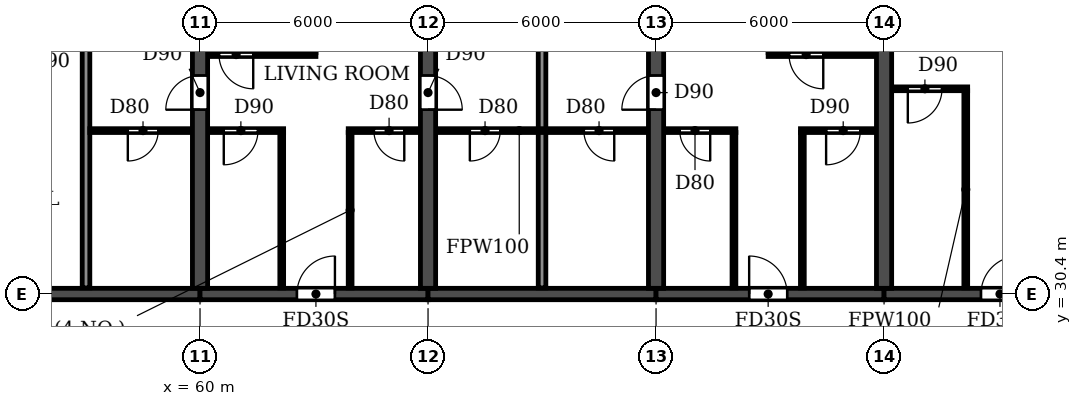
"""IFC4 building model, lengths in metres.
Left out: names, types, materials, properties, quantities, classifications, styles, units other than length and angle.
Written with IfcOpenShell. Run it as: python <this file> out.ifc"""

import sys

from ifc_helpers import new_model, si_unit, direction, frame, frame_2d, origin, place, context, subcontext, project, spatial, rectangle, extrude, element, fill, save


model = new_model("IFC4")
c1 = context("Model", 3, precision=1e-05, world=origin(), true_north=direction((0.0, 1.0)))
c2 = subcontext(c1, "Body", "Model", "MODEL_VIEW")
j1 = project(units=[si_unit("LENGTHUNIT", "METRE"), si_unit("PLANEANGLEUNIT", "RADIAN")], contexts=[c1])
p1 = place(None, origin())
s1 = spatial("IfcSite", under=j1, at=p1, CompositionType="ELEMENT")
p2 = place(p1, origin())
s2 = spatial("IfcBuilding", under=s1, at=p2, CompositionType="ELEMENT")
p3 = place(p2, frame((0.0, 0.0, 33.3)))
s3 = spatial("IfcBuildingStorey", under=s2, at=p3, CompositionType="ELEMENT", Elevation=33.3)
p4 = place(p3, frame((60.0, 30.55, 0.0), z_axis=(0.0, 0.0, 1.0), x_axis=(0.0, 1.0, 0.0)))
e1 = element("IfcWall", 1, at=p4, inside=s3, PredefinedType="SHEAR", context=c2, shape_type="SweptSolid", body=[
    extrude(rectangle(XDim=14.05, YDim=0.4, at=frame_2d((7.025, 0.0))), origin(), (0.0, 0.0, 1.0), 3.05),
])
p5 = place(p4, frame((4.7, 0.0, 0.0)))
e2 = element("IfcOpeningElement", 2, at=p5, cuts=e1, PredefinedType="OPENING", context=c2, shape_type="SweptSolid", body=[
    extrude(rectangle(XDim=0.9, YDim=2.1, at=frame_2d((0.45, 1.05))), frame((0.0, 0.21, 0.0), z_axis=(0.0, -1.0, 0.0), x_axis=(1.0, 0.0, 0.0)), (0.0, 0.0, 1.0), 0.42),
])
p6 = place(p3, frame((66.0, 30.55, 0.0), z_axis=(0.0, 0.0, 1.0), x_axis=(0.0, 1.0, 0.0)))
e3 = element("IfcWall", 3, at=p6, inside=s3, PredefinedType="SHEAR", context=c2, shape_type="SweptSolid", body=[
    extrude(rectangle(XDim=14.05, YDim=0.4, at=frame_2d((7.025, 0.0))), origin(), (0.0, 0.0, 1.0), 3.05),
])
p7 = place(p6, frame((4.7, 0.0, 0.0)))
e4 = element("IfcOpeningElement", 4, at=p7, cuts=e3, PredefinedType="OPENING", context=c2, shape_type="SweptSolid", body=[
    extrude(rectangle(XDim=0.9, YDim=2.1, at=frame_2d((0.45, 1.05))), frame((0.0, 0.21, 0.0), z_axis=(0.0, -1.0, 0.0), x_axis=(1.0, 0.0, 0.0)), (0.0, 0.0, 1.0), 0.42),
])
p8 = place(p3, frame((72.0, 30.55, 0.0), z_axis=(0.0, 0.0, 1.0), x_axis=(0.0, 1.0, 0.0)))
e5 = element("IfcWall", 5, at=p8, inside=s3, PredefinedType="SHEAR", context=c2, shape_type="SweptSolid", body=[
    extrude(rectangle(XDim=14.05, YDim=0.4, at=frame_2d((7.025, 0.0))), origin(), (0.0, 0.0, 1.0), 3.05),
])
p9 = place(p8, frame((4.7, 0.0, 0.0)))
e6 = element("IfcOpeningElement", 6, at=p9, cuts=e5, PredefinedType="OPENING", context=c2, shape_type="SweptSolid", body=[
    extrude(rectangle(XDim=0.9, YDim=2.1, at=frame_2d((0.45, 1.05))), frame((0.0, 0.21, 0.0), z_axis=(0.0, -1.0, 0.0), x_axis=(1.0, 0.0, 0.0)), (0.0, 0.0, 1.0), 0.42),
])
p10 = place(p3, frame((78.0, 30.55, 0.0), z_axis=(0.0, 0.0, 1.0), x_axis=(0.0, 1.0, 0.0)))
e7 = element("IfcWall", 7, at=p10, inside=s3, PredefinedType="SHEAR", context=c2, shape_type="SweptSolid", body=[
    extrude(rectangle(XDim=14.05, YDim=0.4, at=frame_2d((7.025, 0.0))), origin(), (0.0, 0.0, 1.0), 3.05),
])
p11 = place(p3, frame((54.0, 30.4, 0.0), z_axis=(0.0, 0.0, 1.0), x_axis=(1.0, 0.0, 0.0)))
e8 = element("IfcWall", 8, at=p11, inside=s3, PredefinedType="SHEAR", context=c2, shape_type="SweptSolid", body=[
    extrude(rectangle(XDim=6.0, YDim=0.3, at=frame_2d((3.0, 0.0))), origin(), (0.0, 0.0, 1.0), 2.45),
])
p12 = place(p3, frame((60.0, 30.4, 0.0), z_axis=(0.0, 0.0, 1.0), x_axis=(1.0, 0.0, 0.0)))
e9 = element("IfcWall", 9, at=p12, inside=s3, PredefinedType="SHEAR", context=c2, shape_type="SweptSolid", body=[
    extrude(rectangle(XDim=6.0, YDim=0.3, at=frame_2d((3.0, 0.0))), origin(), (0.0, 0.0, 1.0), 2.45),
])
p13 = place(p12, frame((2.55, 0.0, 0.0)))
e10 = element("IfcOpeningElement", 10, at=p13, cuts=e9, PredefinedType="OPENING", context=c2, shape_type="SweptSolid", body=[
    extrude(rectangle(XDim=1.0, YDim=2.1, at=frame_2d((0.5, 1.05))), frame((0.0, 0.16, 0.0), z_axis=(0.0, -1.0, 0.0), x_axis=(1.0, 0.0, 0.0)), (0.0, 0.0, 1.0), 0.32),
])
p14 = place(p3, frame((66.0, 30.4, 0.0), z_axis=(0.0, 0.0, 1.0), x_axis=(1.0, 0.0, 0.0)))
e11 = element("IfcWall", 11, at=p14, inside=s3, PredefinedType="SHEAR", context=c2, shape_type="SweptSolid", body=[
    extrude(rectangle(XDim=6.0, YDim=0.3, at=frame_2d((3.0, 0.0))), origin(), (0.0, 0.0, 1.0), 2.45),
])
p15 = place(p3, frame((72.0, 30.4, 0.0), z_axis=(0.0, 0.0, 1.0), x_axis=(1.0, 0.0, 0.0)))
e12 = element("IfcWall", 12, at=p15, inside=s3, PredefinedType="SHEAR", context=c2, shape_type="SweptSolid", body=[
    extrude(rectangle(XDim=6.0, YDim=0.3, at=frame_2d((3.0, 0.0))), origin(), (0.0, 0.0, 1.0), 2.45),
])
p16 = place(p15, frame((2.45, 0.0, 0.0)))
e13 = element("IfcOpeningElement", 13, at=p16, cuts=e12, PredefinedType="OPENING", context=c2, shape_type="SweptSolid", body=[
    extrude(rectangle(XDim=1.0, YDim=2.1, at=frame_2d((0.5, 1.05))), frame((0.0, 0.16, 0.0), z_axis=(0.0, -1.0, 0.0), x_axis=(1.0, 0.0, 0.0)), (0.0, 0.0, 1.0), 0.32),
])
p17 = place(p3, frame((78.0, 30.4, 0.0), z_axis=(0.0, 0.0, 1.0), x_axis=(1.0, 0.0, 0.0)))
e14 = element("IfcWall", 14, at=p17, inside=s3, PredefinedType="SHEAR", context=c2, shape_type="SweptSolid", body=[
    extrude(rectangle(XDim=6.0, YDim=0.3, at=frame_2d((3.0, 0.0))), origin(), (0.0, 0.0, 1.0), 2.45),
])
p18 = place(p17, frame((2.55, 0.0, 0.0)))
e15 = element("IfcOpeningElement", 15, at=p18, cuts=e14, PredefinedType="OPENING", context=c2, shape_type="SweptSolid", body=[
    extrude(rectangle(XDim=1.0, YDim=2.1, at=frame_2d((0.5, 1.05))), frame((0.0, 0.16, 0.0), z_axis=(0.0, -1.0, 0.0), x_axis=(1.0, 0.0, 0.0)), (0.0, 0.0, 1.0), 0.32),
])
for number, where, z_axis, x_axis in (
    (16, (57.0, 30.56, 0.0), (0.0, 0.0, 1.0), (0.0, 1.0, 0.0)),
    (17, (69.0, 30.56, 0.0), (0.0, 0.0, 1.0), (0.0, 1.0, 0.0)),
):
    element("IfcWall", number, at=place(p3, frame(where, z_axis=z_axis, x_axis=x_axis)), inside=s3, PredefinedType="PARTITIONING", context=c2, shape_type="SweptSolid", body=[
        extrude(rectangle(XDim=14.18, YDim=0.2, at=frame_2d((7.09, 0.0))), origin(), (0.0, 0.0, 1.0), 3.05),
    ])
p19 = place(p3, frame((57.1, 34.7, 0.0), z_axis=(0.0, 0.0, 1.0), x_axis=(1.0, 0.0, 0.0)))
e18 = element("IfcWall", 18, at=p19, inside=s3, PredefinedType="PARTITIONING", context=c2, shape_type="SweptSolid", body=[
    extrude(rectangle(XDim=2.69, YDim=0.1, at=frame_2d((1.345, 0.0))), origin(), (0.0, 0.0, 1.0), 3.05),
])
p20 = place(p19, frame((1.0, 0.0, 0.0)))
e19 = element("IfcOpeningElement", 19, at=p20, cuts=e18, PredefinedType="OPENING", context=c2, shape_type="SweptSolid", body=[
    extrude(rectangle(XDim=0.8, YDim=2.1, at=frame_2d((0.4, 1.05))), frame((0.0, 0.06, 0.0), z_axis=(0.0, -1.0, 0.0), x_axis=(1.0, 0.0, 0.0)), (0.0, 0.0, 1.0), 0.12),
])
p21 = place(p3, frame((60.21, 34.7, 0.0), z_axis=(0.0, 0.0, 1.0), x_axis=(1.0, 0.0, 0.0)))
e20 = element("IfcWall", 20, at=p21, inside=s3, PredefinedType="PARTITIONING", context=c2, shape_type="SweptSolid", body=[
    extrude(rectangle(XDim=1.99, YDim=0.1, at=frame_2d((0.995, 0.0))), origin(), (0.0, 0.0, 1.0), 3.05),
])
p22 = place(p21, frame((0.415, 0.0, 0.0)))
e21 = element("IfcOpeningElement", 21, at=p22, cuts=e20, PredefinedType="OPENING", context=c2, shape_type="SweptSolid", body=[
    extrude(rectangle(XDim=0.9, YDim=2.1, at=frame_2d((0.45, 1.05))), frame((0.0, 0.06, 0.0), z_axis=(0.0, -1.0, 0.0), x_axis=(1.0, 0.0, 0.0)), (0.0, 0.0, 1.0), 0.12),
])
p23 = place(p3, frame((63.9, 34.7, 0.0), z_axis=(0.0, 0.0, 1.0), x_axis=(1.0, 0.0, 0.0)))
e22 = element("IfcWall", 22, at=p23, inside=s3, PredefinedType="PARTITIONING", context=c2, shape_type="SweptSolid", body=[
    extrude(rectangle(XDim=1.89, YDim=0.1, at=frame_2d((0.945, 0.0))), origin(), (0.0, 0.0, 1.0), 3.05),
])
p24 = place(p23, frame((0.675, 0.0, 0.0)))
e23 = element("IfcOpeningElement", 23, at=p24, cuts=e22, PredefinedType="OPENING", context=c2, shape_type="SweptSolid", body=[
    extrude(rectangle(XDim=0.8, YDim=2.1, at=frame_2d((0.4, 1.05))), frame((0.0, 0.06, 0.0), z_axis=(0.0, -1.0, 0.0), x_axis=(1.0, 0.0, 0.0)), (0.0, 0.0, 1.0), 0.12),
])
p25 = place(p3, frame((66.21, 34.7, 0.0), z_axis=(0.0, 0.0, 1.0), x_axis=(1.0, 0.0, 0.0)))
e24 = element("IfcWall", 24, at=p25, inside=s3, PredefinedType="PARTITIONING", context=c2, shape_type="SweptSolid", body=[
    extrude(rectangle(XDim=5.58, YDim=0.1, at=frame_2d((2.79, 0.0))), origin(), (0.0, 0.0, 1.0), 3.05),
])
p26 = place(p25, frame((0.89, 0.0, 0.0)))
e25 = element("IfcOpeningElement", 25, at=p26, cuts=e24, PredefinedType="OPENING", context=c2, shape_type="SweptSolid", body=[
    extrude(rectangle(XDim=0.8, YDim=2.1, at=frame_2d((0.4, 1.05))), frame((0.0, 0.06, 0.0), z_axis=(0.0, -1.0, 0.0), x_axis=(1.0, 0.0, 0.0)), (0.0, 0.0, 1.0), 0.12),
])
p27 = place(p25, frame((3.89, 0.0, 0.0)))
e26 = element("IfcOpeningElement", 26, at=p27, cuts=e24, PredefinedType="OPENING", context=c2, shape_type="SweptSolid", body=[
    extrude(rectangle(XDim=0.8, YDim=2.1, at=frame_2d((0.4, 1.05))), frame((0.0, 0.06, 0.0), z_axis=(0.0, -1.0, 0.0), x_axis=(1.0, 0.0, 0.0)), (0.0, 0.0, 1.0), 0.12),
])
p28 = place(p3, frame((72.21, 34.7, 0.0), z_axis=(0.0, 0.0, 1.0), x_axis=(1.0, 0.0, 0.0)))
e27 = element("IfcWall", 27, at=p28, inside=s3, PredefinedType="PARTITIONING", context=c2, shape_type="SweptSolid", body=[
    extrude(rectangle(XDim=1.89, YDim=0.1, at=frame_2d((0.945, 0.0))), origin(), (0.0, 0.0, 1.0), 3.05),
])
p29 = place(p28, frame((0.415, 0.0, 0.0)))
e28 = element("IfcOpeningElement", 28, at=p29, cuts=e27, PredefinedType="OPENING", context=c2, shape_type="SweptSolid", body=[
    extrude(rectangle(XDim=0.8, YDim=2.1, at=frame_2d((0.4, 1.05))), frame((0.0, 0.06, 0.0), z_axis=(0.0, -1.0, 0.0), x_axis=(1.0, 0.0, 0.0)), (0.0, 0.0, 1.0), 0.12),
])
p30 = place(p3, frame((75.8, 34.7, 0.0), z_axis=(0.0, 0.0, 1.0), x_axis=(1.0, 0.0, 0.0)))
e29 = element("IfcWall", 29, at=p30, inside=s3, PredefinedType="PARTITIONING", context=c2, shape_type="SweptSolid", body=[
    extrude(rectangle(XDim=1.99, YDim=0.1, at=frame_2d((0.995, 0.0))), origin(), (0.0, 0.0, 1.0), 3.05),
])
p31 = place(p30, frame((0.675, 0.0, 0.0)))
e30 = element("IfcOpeningElement", 30, at=p31, cuts=e29, PredefinedType="OPENING", context=c2, shape_type="SweptSolid", body=[
    extrude(rectangle(XDim=0.9, YDim=2.1, at=frame_2d((0.45, 1.05))), frame((0.0, 0.06, 0.0), z_axis=(0.0, -1.0, 0.0), x_axis=(1.0, 0.0, 0.0)), (0.0, 0.0, 1.0), 0.12),
])
p32 = place(p3, frame((78.21, 35.8, 0.0), z_axis=(0.0, 0.0, 1.0), x_axis=(1.0, 0.0, 0.0)))
e31 = element("IfcWall", 31, at=p32, inside=s3, PredefinedType="PARTITIONING", context=c2, shape_type="SweptSolid", body=[
    extrude(rectangle(XDim=1.99, YDim=0.1, at=frame_2d((0.995, 0.0))), origin(), (0.0, 0.0, 1.0), 3.05),
])
p33 = place(p32, frame((0.415, 0.0, 0.0)))
e32 = element("IfcOpeningElement", 32, at=p33, cuts=e31, PredefinedType="OPENING", context=c2, shape_type="SweptSolid", body=[
    extrude(rectangle(XDim=0.9, YDim=2.1, at=frame_2d((0.45, 1.05))), frame((0.0, 0.06, 0.0), z_axis=(0.0, -1.0, 0.0), x_axis=(1.0, 0.0, 0.0)), (0.0, 0.0, 1.0), 0.12),
])
p34 = place(p3, frame((60.21, 36.7, 0.0), z_axis=(0.0, 0.0, 1.0), x_axis=(1.0, 0.0, 0.0)))
e33 = element("IfcWall", 33, at=p34, inside=s3, PredefinedType="PARTITIONING", context=c2, shape_type="SweptSolid", body=[
    extrude(rectangle(XDim=2.84, YDim=0.1, at=frame_2d((1.42, 0.0))), origin(), (0.0, 0.0, 1.0), 3.05),
])
p35 = place(p34, frame((0.29, 0.0, 0.0)))
e34 = element("IfcOpeningElement", 34, at=p35, cuts=e33, PredefinedType="OPENING", context=c2, shape_type="SweptSolid", body=[
    extrude(rectangle(XDim=0.9, YDim=2.1, at=frame_2d((0.45, 1.05))), frame((0.0, 0.06, 0.0), z_axis=(0.0, -1.0, 0.0), x_axis=(1.0, 0.0, 0.0)), (0.0, 0.0, 1.0), 0.12),
])
p36 = place(p3, frame((74.95, 36.7, 0.0), z_axis=(0.0, 0.0, 1.0), x_axis=(1.0, 0.0, 0.0)))
e35 = element("IfcWall", 35, at=p36, inside=s3, PredefinedType="PARTITIONING", context=c2, shape_type="SweptSolid", body=[
    extrude(rectangle(XDim=2.84, YDim=0.1, at=frame_2d((1.42, 0.0))), origin(), (0.0, 0.0, 1.0), 3.05),
])
p37 = place(p36, frame((0.55, 0.0, 0.0)))
e36 = element("IfcOpeningElement", 36, at=p37, cuts=e35, PredefinedType="OPENING", context=c2, shape_type="SweptSolid", body=[
    extrude(rectangle(XDim=0.9, YDim=2.1, at=frame_2d((0.45, 1.05))), frame((0.0, 0.06, 0.0), z_axis=(0.0, -1.0, 0.0), x_axis=(1.0, 0.0, 0.0)), (0.0, 0.0, 1.0), 0.12),
])
for number, where, z_axis, x_axis in (
    (37, (62.15, 30.56, 0.0), (0.0, 0.0, 1.0), (0.0, 1.0, 0.0)),
    (38, (63.95, 30.56, 0.0), (0.0, 0.0, 1.0), (0.0, 1.0, 0.0)),
    (39, (74.05, 30.56, 0.0), (0.0, 0.0, 1.0), (0.0, 1.0, 0.0)),
    (40, (75.85, 30.56, 0.0), (0.0, 0.0, 1.0), (0.0, 1.0, 0.0)),
):
    element("IfcWall", number, at=place(p3, frame(where, z_axis=z_axis, x_axis=x_axis)), inside=s3, PredefinedType="PARTITIONING", context=c2, shape_type="SweptSolid", body=[
        extrude(rectangle(XDim=4.09, YDim=0.1, at=frame_2d((2.045, 0.0))), origin(), (0.0, 0.0, 1.0), 3.05),
    ])
p38 = place(p3, frame((80.15, 30.56, 0.0), z_axis=(0.0, 0.0, 1.0), x_axis=(0.0, 1.0, 0.0)))
e41 = element("IfcWall", 41, at=p38, inside=s3, PredefinedType="PARTITIONING", context=c2, shape_type="SweptSolid", body=[
    extrude(rectangle(XDim=5.19, YDim=0.1, at=frame_2d((2.595, 0.0))), origin(), (0.0, 0.0, 1.0), 3.05),
])
p39 = place(p20, frame((0.8, 0.0, 0.0), z_axis=(0.0, 0.0, 1.0), x_axis=(-1.0, 0.0, 0.0)))
e42 = element("IfcDoor", 42, at=p39, inside=s3, OperationType="SINGLE_SWING_RIGHT", PredefinedType="DOOR", context=c2, shape_type="SweptSolid", body=[
    extrude(rectangle(XDim=0.8, YDim=2.1, at=frame_2d((0.4, 1.05))), frame((0.0, 0.025, 0.0), z_axis=(0.0, -1.0, 0.0), x_axis=(1.0, 0.0, 0.0)), (0.0, 0.0, 1.0), 0.05),
])
fill(e19, e42)
p40 = place(p26, frame((0.8, 0.0, 0.0), z_axis=(0.0, 0.0, 1.0), x_axis=(-1.0, 0.0, 0.0)))
e43 = element("IfcDoor", 43, at=p40, inside=s3, OperationType="SINGLE_SWING_RIGHT", PredefinedType="DOOR", context=c2, shape_type="SweptSolid", body=[
    extrude(rectangle(XDim=0.8, YDim=2.1, at=frame_2d((0.4, 1.05))), frame((0.0, 0.025, 0.0), z_axis=(0.0, -1.0, 0.0), x_axis=(1.0, 0.0, 0.0)), (0.0, 0.0, 1.0), 0.05),
])
fill(e25, e43)
p41 = place(p5, origin())
e44 = element("IfcDoor", 44, at=p41, inside=s3, OperationType="SINGLE_SWING_LEFT", PredefinedType="DOOR", context=c2, shape_type="SweptSolid", body=[
    extrude(rectangle(XDim=0.9, YDim=2.1, at=frame_2d((0.45, 1.05))), frame((0.0, 0.025, 0.0), z_axis=(0.0, -1.0, 0.0), x_axis=(1.0, 0.0, 0.0)), (0.0, 0.0, 1.0), 0.05),
])
fill(e2, e44)
p42 = place(p35, frame((0.9, 0.0, 0.0), z_axis=(0.0, 0.0, 1.0), x_axis=(-1.0, 0.0, 0.0)))
e45 = element("IfcDoor", 45, at=p42, inside=s3, OperationType="SINGLE_SWING_LEFT", PredefinedType="DOOR", context=c2, shape_type="SweptSolid", body=[
    extrude(rectangle(XDim=0.9, YDim=2.1, at=frame_2d((0.45, 1.05))), frame((0.0, 0.025, 0.0), z_axis=(0.0, -1.0, 0.0), x_axis=(1.0, 0.0, 0.0)), (0.0, 0.0, 1.0), 0.05),
])
fill(e34, e45)
p43 = place(p22, frame((0.9, 0.0, 0.0), z_axis=(0.0, 0.0, 1.0), x_axis=(-1.0, 0.0, 0.0)))
e46 = element("IfcDoor", 46, at=p43, inside=s3, OperationType="SINGLE_SWING_RIGHT", PredefinedType="DOOR", context=c2, shape_type="SweptSolid", body=[
    extrude(rectangle(XDim=0.9, YDim=2.1, at=frame_2d((0.45, 1.05))), frame((0.0, 0.025, 0.0), z_axis=(0.0, -1.0, 0.0), x_axis=(1.0, 0.0, 0.0)), (0.0, 0.0, 1.0), 0.05),
])
fill(e21, e46)
p44 = place(p13, origin())
e47 = element("IfcDoor", 47, at=p44, inside=s3, OperationType="SINGLE_SWING_RIGHT", PredefinedType="DOOR", context=c2, shape_type="SweptSolid", body=[
    extrude(rectangle(XDim=1.0, YDim=2.1, at=frame_2d((0.5, 1.05))), frame((0.0, 0.025, 0.0), z_axis=(0.0, -1.0, 0.0), x_axis=(1.0, 0.0, 0.0)), (0.0, 0.0, 1.0), 0.05),
])
fill(e10, e47)
p45 = place(p24, frame((0.8, 0.0, 0.0), z_axis=(0.0, 0.0, 1.0), x_axis=(-1.0, 0.0, 0.0)))
e48 = element("IfcDoor", 48, at=p45, inside=s3, OperationType="SINGLE_SWING_LEFT", PredefinedType="DOOR", context=c2, shape_type="SweptSolid", body=[
    extrude(rectangle(XDim=0.8, YDim=2.1, at=frame_2d((0.4, 1.05))), frame((0.0, 0.025, 0.0), z_axis=(0.0, -1.0, 0.0), x_axis=(1.0, 0.0, 0.0)), (0.0, 0.0, 1.0), 0.05),
])
fill(e23, e48)
p46 = place(p7, frame((0.9, 0.0, 0.0), z_axis=(0.0, 0.0, 1.0), x_axis=(-1.0, 0.0, 0.0)))
e49 = element("IfcDoor", 49, at=p46, inside=s3, OperationType="SINGLE_SWING_RIGHT", PredefinedType="DOOR", context=c2, shape_type="SweptSolid", body=[
    extrude(rectangle(XDim=0.9, YDim=2.1, at=frame_2d((0.45, 1.05))), frame((0.0, 0.025, 0.0), z_axis=(0.0, -1.0, 0.0), x_axis=(1.0, 0.0, 0.0)), (0.0, 0.0, 1.0), 0.05),
])
fill(e4, e49)
p47 = place(p27, frame((0.8, 0.0, 0.0), z_axis=(0.0, 0.0, 1.0), x_axis=(-1.0, 0.0, 0.0)))
e50 = element("IfcDoor", 50, at=p47, inside=s3, OperationType="SINGLE_SWING_LEFT", PredefinedType="DOOR", context=c2, shape_type="SweptSolid", body=[
    extrude(rectangle(XDim=0.8, YDim=2.1, at=frame_2d((0.4, 1.05))), frame((0.0, 0.025, 0.0), z_axis=(0.0, -1.0, 0.0), x_axis=(1.0, 0.0, 0.0)), (0.0, 0.0, 1.0), 0.05),
])
fill(e26, e50)
p48 = place(p9, origin())
e51 = element("IfcDoor", 51, at=p48, inside=s3, OperationType="SINGLE_SWING_LEFT", PredefinedType="DOOR", context=c2, shape_type="SweptSolid", body=[
    extrude(rectangle(XDim=0.9, YDim=2.1, at=frame_2d((0.45, 1.05))), frame((0.0, 0.025, 0.0), z_axis=(0.0, -1.0, 0.0), x_axis=(1.0, 0.0, 0.0)), (0.0, 0.0, 1.0), 0.05),
])
fill(e6, e51)
p49 = place(p29, frame((0.8, 0.0, 0.0), z_axis=(0.0, 0.0, 1.0), x_axis=(-1.0, 0.0, 0.0)))
e52 = element("IfcDoor", 52, at=p49, inside=s3, OperationType="SINGLE_SWING_LEFT", PredefinedType="DOOR", context=c2, shape_type="SweptSolid", body=[
    extrude(rectangle(XDim=0.8, YDim=2.1, at=frame_2d((0.4, 1.05))), frame((0.0, 0.025, 0.0), z_axis=(0.0, -1.0, 0.0), x_axis=(1.0, 0.0, 0.0)), (0.0, 0.0, 1.0), 0.05),
])
fill(e28, e52)
p50 = place(p16, origin())
e53 = element("IfcDoor", 53, at=p50, inside=s3, OperationType="SINGLE_SWING_LEFT", PredefinedType="DOOR", context=c2, shape_type="SweptSolid", body=[
    extrude(rectangle(XDim=1.0, YDim=2.1, at=frame_2d((0.5, 1.05))), frame((0.0, 0.025, 0.0), z_axis=(0.0, -1.0, 0.0), x_axis=(1.0, 0.0, 0.0)), (0.0, 0.0, 1.0), 0.05),
])
fill(e13, e53)
p51 = place(p37, frame((0.9, 0.0, 0.0), z_axis=(0.0, 0.0, 1.0), x_axis=(-1.0, 0.0, 0.0)))
e54 = element("IfcDoor", 54, at=p51, inside=s3, OperationType="SINGLE_SWING_LEFT", PredefinedType="DOOR", context=c2, shape_type="SweptSolid", body=[
    extrude(rectangle(XDim=0.9, YDim=2.1, at=frame_2d((0.45, 1.05))), frame((0.0, 0.025, 0.0), z_axis=(0.0, -1.0, 0.0), x_axis=(1.0, 0.0, 0.0)), (0.0, 0.0, 1.0), 0.05),
])
fill(e36, e54)
p52 = place(p31, frame((0.9, 0.0, 0.0), z_axis=(0.0, 0.0, 1.0), x_axis=(-1.0, 0.0, 0.0)))
e55 = element("IfcDoor", 55, at=p52, inside=s3, OperationType="SINGLE_SWING_RIGHT", PredefinedType="DOOR", context=c2, shape_type="SweptSolid", body=[
    extrude(rectangle(XDim=0.9, YDim=2.1, at=frame_2d((0.45, 1.05))), frame((0.0, 0.025, 0.0), z_axis=(0.0, -1.0, 0.0), x_axis=(1.0, 0.0, 0.0)), (0.0, 0.0, 1.0), 0.05),
])
fill(e30, e55)
p53 = place(p33, frame((0.9, 0.0, 0.0), z_axis=(0.0, 0.0, 1.0), x_axis=(-1.0, 0.0, 0.0)))
e56 = element("IfcDoor", 56, at=p53, inside=s3, OperationType="SINGLE_SWING_RIGHT", PredefinedType="DOOR", context=c2, shape_type="SweptSolid", body=[
    extrude(rectangle(XDim=0.9, YDim=2.1, at=frame_2d((0.45, 1.05))), frame((0.0, 0.025, 0.0), z_axis=(0.0, -1.0, 0.0), x_axis=(1.0, 0.0, 0.0)), (0.0, 0.0, 1.0), 0.05),
])
fill(e32, e56)
p54 = place(p18, origin())
e57 = element("IfcDoor", 57, at=p54, inside=s3, OperationType="SINGLE_SWING_RIGHT", PredefinedType="DOOR", context=c2, shape_type="SweptSolid", body=[
    extrude(rectangle(XDim=1.0, YDim=2.1, at=frame_2d((0.5, 1.05))), frame((0.0, 0.025, 0.0), z_axis=(0.0, -1.0, 0.0), x_axis=(1.0, 0.0, 0.0)), (0.0, 0.0, 1.0), 0.05),
])
fill(e15, e57)
save(model, sys.argv[1])
